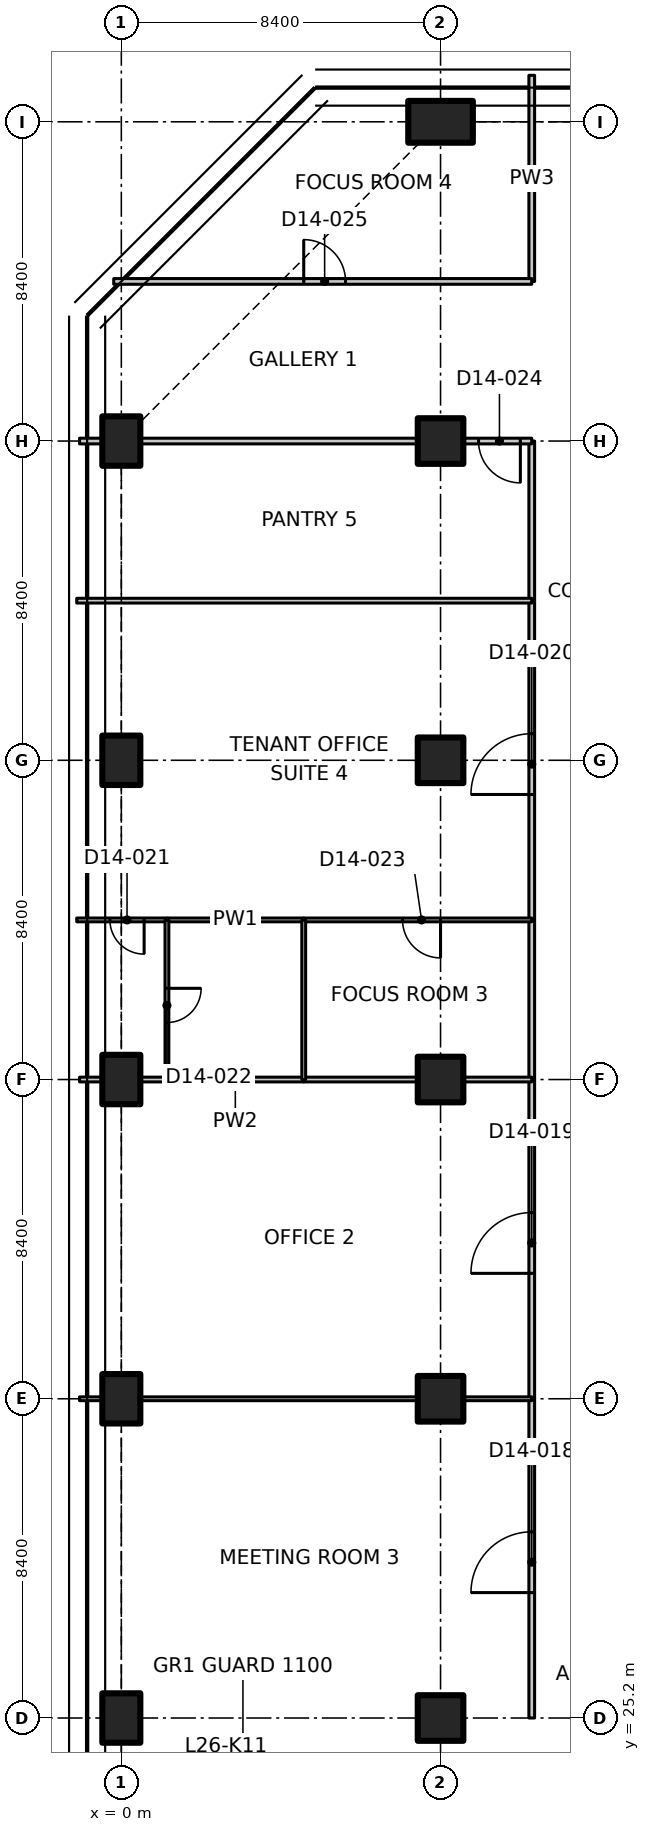
"""IFC4 building model, lengths in metres.
Left out: names, types, materials, properties, quantities, classifications, styles, units other than length and angle.
Written with IfcOpenShell. Run it as: python <this file> out.ifc"""

import sys

from ifc_helpers import new_model, si_unit, direction, frame, frame_2d, origin, origin_2d, place, context, subcontext, project, spatial, polyline, rectangle, outline, extrude, element, fill, save


model = new_model("IFC4")
c1 = context("Model", 3, precision=1e-05, world=origin(), true_north=direction((0.0, 1.0)))
c2 = subcontext(c1, "Body", "Model", "MODEL_VIEW")
j1 = project(units=[si_unit("LENGTHUNIT", "METRE"), si_unit("PLANEANGLEUNIT", "RADIAN")], contexts=[c1])
p1 = place(None, origin())
s1 = spatial("IfcSite", under=j1, at=p1, CompositionType="ELEMENT")
p2 = place(p1, origin())
s2 = spatial("IfcBuilding", under=s1, at=p2, CompositionType="ELEMENT")
p3 = place(p2, frame((0.0, 0.0, 109.7)))
s3 = spatial("IfcBuildingStorey", under=s2, at=p3, CompositionType="ELEMENT", Elevation=109.7)
for number, where, z_axis, x_axis in (
    (1, (0.0, 25.2, 0.0), (0.0, 0.0, 1.0), (1.0, 0.0, 0.0)),
    (2, (0.0, 33.6, 0.0), (0.0, 0.0, 1.0), (1.0, 0.0, 0.0)),
    (3, (0.0, 42.0, 0.0), (0.0, 0.0, 1.0), (1.0, 0.0, 0.0)),
    (4, (0.0, 50.4, 0.0), (0.0, 0.0, 1.0), (1.0, 0.0, 0.0)),
    (5, (0.0, 58.8, 0.0), (0.0, 0.0, 1.0), (1.0, 0.0, 0.0)),
):
    element("IfcColumn", number, at=place(p3, frame(where, z_axis=z_axis, x_axis=x_axis)), inside=s3, PredefinedType="COLUMN", context=c2, shape_type="SweptSolid", body=[
        extrude(rectangle(XDim=1.0, YDim=1.3, at=origin_2d()), origin(), (0.0, 0.0, 1.0), 3.35),
    ])
for number, where, z_axis, x_axis in (
    (6, (8.4, 25.2, 0.0), (0.0, 0.0, 1.0), (1.0, 0.0, 0.0)),
    (7, (8.4, 33.6, 0.0), (0.0, 0.0, 1.0), (1.0, 0.0, 0.0)),
    (8, (8.4, 42.0, 0.0), (0.0, 0.0, 1.0), (1.0, 0.0, 0.0)),
    (9, (8.4, 50.4, 0.0), (0.0, 0.0, 1.0), (1.0, 0.0, 0.0)),
    (10, (8.4, 58.8, 0.0), (0.0, 0.0, 1.0), (1.0, 0.0, 0.0)),
):
    element("IfcColumn", number, at=place(p3, frame(where, z_axis=z_axis, x_axis=x_axis)), inside=s3, PredefinedType="COLUMN", context=c2, shape_type="SweptSolid", body=[
        extrude(rectangle(XDim=1.2, YDim=1.2, at=origin_2d()), origin(), (0.0, 0.0, 1.0), 3.35),
    ])
p4 = place(p3, frame((8.4, 67.2, 0.0), z_axis=(0.0, 0.0, 1.0), x_axis=(0.0, 1.0, 0.0)))
e11 = element("IfcColumn", 11, at=p4, inside=s3, PredefinedType="COLUMN", context=c2, shape_type="SweptSolid", body=[
    extrude(rectangle(XDim=1.1, YDim=1.7, at=origin_2d()), origin(), (0.0, 0.0, 1.0), 3.35),
])
p5 = place(p3, frame((10.8, 25.2, 0.0), z_axis=(0.0, 0.0, 1.0), x_axis=(0.0, 1.0, 0.0)))
e12 = element("IfcWall", 12, at=p5, inside=s3, PredefinedType="PARTITIONING", context=c2, shape_type="SweptSolid", body=[
    extrude(rectangle(XDim=8.4, YDim=0.15, at=frame_2d((4.2, 0.0))), origin(), (0.0, 0.0, 1.0), 3.33),
])
p6 = place(p5, frame((3.3, 0.0, 0.0)))
e13 = element("IfcOpeningElement", 13, at=p6, cuts=e12, PredefinedType="OPENING", context=c2, shape_type="SweptSolid", body=[
    extrude(rectangle(XDim=1.6, YDim=2.1, at=frame_2d((0.8, 1.05))), frame((0.0, 0.085, 0.0), z_axis=(0.0, -1.0, 0.0), x_axis=(1.0, 0.0, 0.0)), (0.0, 0.0, 1.0), 0.17),
])
p7 = place(p3, frame((10.8, 33.6, 0.0), z_axis=(0.0, 0.0, 1.0), x_axis=(0.0, 1.0, 0.0)))
e14 = element("IfcWall", 14, at=p7, inside=s3, PredefinedType="PARTITIONING", context=c2, shape_type="SweptSolid", body=[
    extrude(rectangle(XDim=8.4, YDim=0.15, at=frame_2d((4.2, 0.0))), origin(), (0.0, 0.0, 1.0), 3.33),
])
p8 = place(p7, frame((3.3, 0.0, 0.0)))
e15 = element("IfcOpeningElement", 15, at=p8, cuts=e14, PredefinedType="OPENING", context=c2, shape_type="SweptSolid", body=[
    extrude(rectangle(XDim=1.6, YDim=2.1, at=frame_2d((0.8, 1.05))), frame((0.0, 0.085, 0.0), z_axis=(0.0, -1.0, 0.0), x_axis=(1.0, 0.0, 0.0)), (0.0, 0.0, 1.0), 0.17),
])
p9 = place(p3, frame((10.8, 46.2, 0.0), z_axis=(0.0, 0.0, 1.0), x_axis=(0.0, 1.0, 0.0)))
e16 = element("IfcWall", 16, at=p9, inside=s3, PredefinedType="PARTITIONING", context=c2, shape_type="SweptSolid", body=[
    extrude(rectangle(XDim=8.4, YDim=0.15, at=frame_2d((4.2, 0.0))), origin(), (0.0, 0.0, 1.0), 3.33),
])
p10 = place(p9, frame((3.3, 0.0, 0.0)))
e17 = element("IfcOpeningElement", 17, at=p10, cuts=e16, PredefinedType="OPENING", context=c2, shape_type="SweptSolid", body=[
    extrude(rectangle(XDim=1.6, YDim=2.1, at=frame_2d((0.8, 1.05))), frame((0.0, 0.085, 0.0), z_axis=(0.0, -1.0, 0.0), x_axis=(1.0, 0.0, 0.0)), (0.0, 0.0, 1.0), 0.17),
])
for number, where, z_axis, x_axis in (
    (18, (10.8, 42.0, 0.0), (0.0, 0.0, 1.0), (0.0, 1.0, 0.0)),
    (19, (10.8, 54.6, 0.0), (0.0, 0.0, 1.0), (0.0, 1.0, 0.0)),
):
    element("IfcWall", number, at=place(p3, frame(where, z_axis=z_axis, x_axis=x_axis)), inside=s3, PredefinedType="PARTITIONING", context=c2, shape_type="SweptSolid", body=[
        extrude(rectangle(XDim=4.2, YDim=0.15, at=frame_2d((2.1, 0.0))), origin(), (0.0, 0.0, 1.0), 3.33),
    ])
p11 = place(p3, frame((10.8, 63.0, 0.0), z_axis=(0.0, 0.0, 1.0), x_axis=(0.0, 1.0, 0.0)))
e20 = element("IfcWall", 20, at=p11, inside=s3, PredefinedType="PARTITIONING", context=c2, shape_type="SweptSolid", body=[
    extrude(outline(polyline([(0.0, 0.0), (5.423, 0.0), (5.423, 3.33), (5.28, 3.33), (4.65, 3.33), (4.648, 2.98), (3.752, 2.98), (3.75, 3.33), (0.0, 3.33), (0.0, 0.0)])), frame((0.0, 0.075, 0.0), z_axis=(0.0, -1.0, 0.0), x_axis=(1.0, 0.0, 0.0)), (0.0, 0.0, 1.0), 0.15),
])
p12 = place(p3, frame((10.8, 58.8, 0.0), z_axis=(0.0, 0.0, 1.0), x_axis=(-1.0, 0.0, 0.0)))
e21 = element("IfcWall", 21, at=p12, inside=s3, PredefinedType="PARTITIONING", context=c2, shape_type="SweptSolid", body=[
    extrude(rectangle(XDim=1.78, YDim=0.15, at=frame_2d((0.89, 0.0))), origin(), (0.0, 0.0, 1.0), 3.33),
])
p13 = place(p12, frame((0.3, 0.0, 0.0)))
e22 = element("IfcOpeningElement", 22, at=p13, cuts=e21, PredefinedType="OPENING", context=c2, shape_type="SweptSolid", body=[
    extrude(rectangle(XDim=1.1, YDim=2.1, at=frame_2d((0.55, 1.05))), frame((0.0, 0.085, 0.0), z_axis=(0.0, -1.0, 0.0), x_axis=(1.0, 0.0, 0.0)), (0.0, 0.0, 1.0), 0.17),
])
p14 = place(p3, frame((7.78, 58.8, 0.0), z_axis=(0.0, 0.0, 1.0), x_axis=(-1.0, 0.0, 0.0)))
e23 = element("IfcWall", 23, at=p14, inside=s3, PredefinedType="PARTITIONING", context=c2, shape_type="SweptSolid", body=[
    extrude(outline(polyline([(0.0, 0.0), (7.26, 0.0), (7.26, 2.98), (7.091, 2.98), (7.089, 3.33), (0.0, 3.33), (0.0, 0.0)])), frame((0.0, 0.075, 0.0), z_axis=(0.0, -1.0, 0.0), x_axis=(1.0, 0.0, 0.0)), (0.0, 0.0, 1.0), 0.15),
])
p15 = place(p3, frame((-0.52, 58.8, 0.0), z_axis=(0.0, 0.0, 1.0), x_axis=(-1.0, 0.0, 0.0)))
e24 = element("IfcWall", 24, at=p15, inside=s3, PredefinedType="PARTITIONING", context=c2, shape_type="SweptSolid", body=[
    extrude(rectangle(XDim=0.58, YDim=0.15, at=frame_2d((0.29, 0.0))), origin(), (0.0, 0.0, 1.0), 3.33),
])
p16 = place(p3, frame((-0.2, 63.0, 0.0), z_axis=(0.0, 0.0, 1.0), x_axis=(1.0, 0.0, 0.0)))
e25 = element("IfcWall", 25, at=p16, inside=s3, PredefinedType="PARTITIONING", context=c2, shape_type="SweptSolid", body=[
    extrude(outline(polyline([(0.0, 0.0), (11.0, 0.0), (11.0, 3.33), (5.091, 3.33), (5.089, 2.98), (3.711, 2.98), (3.709, 3.33), (0.0, 3.33), (0.0, 0.0)])), frame((0.0, 0.075, 0.0), z_axis=(0.0, -1.0, 0.0), x_axis=(1.0, 0.0, 0.0)), (0.0, 0.0, 1.0), 0.15),
])
p17 = place(p16, frame((5.0, 0.0, 0.0)))
e26 = element("IfcOpeningElement", 26, at=p17, cuts=e25, PredefinedType="OPENING", context=c2, shape_type="SweptSolid", body=[
    extrude(rectangle(XDim=1.1, YDim=2.1, at=frame_2d((0.55, 1.05))), frame((0.0, 0.085, 0.0), z_axis=(0.0, -1.0, 0.0), x_axis=(1.0, 0.0, 0.0)), (0.0, 0.0, 1.0), 0.17),
])
p18 = place(p3, frame((-1.1, 33.6, 0.0), z_axis=(0.0, 0.0, 1.0), x_axis=(1.0, 0.0, 0.0)))
e27 = element("IfcWall", 27, at=p18, inside=s3, PredefinedType="PARTITIONING", context=c2, shape_type="SweptSolid", body=[
    extrude(rectangle(XDim=0.58, YDim=0.1, at=frame_2d((0.29, 0.0))), origin(), (0.0, 0.0, 1.0), 3.33),
])
p19 = place(p3, frame((0.52, 33.6, 0.0), z_axis=(0.0, 0.0, 1.0), x_axis=(1.0, 0.0, 0.0)))
e28 = element("IfcWall", 28, at=p19, inside=s3, PredefinedType="PARTITIONING", context=c2, shape_type="SweptSolid", body=[
    extrude(rectangle(XDim=7.26, YDim=0.1, at=frame_2d((3.63, 0.0))), origin(), (0.0, 0.0, 1.0), 3.33),
])
p20 = place(p3, frame((9.02, 33.6, 0.0), z_axis=(0.0, 0.0, 1.0), x_axis=(1.0, 0.0, 0.0)))
e29 = element("IfcWall", 29, at=p20, inside=s3, PredefinedType="PARTITIONING", context=c2, shape_type="SweptSolid", body=[
    extrude(rectangle(XDim=1.78, YDim=0.1, at=frame_2d((0.89, 0.0))), origin(), (0.0, 0.0, 1.0), 3.33),
])
p21 = place(p3, frame((-1.1, 42.0, 0.0), z_axis=(0.0, 0.0, 1.0), x_axis=(1.0, 0.0, 0.0)))
e30 = element("IfcWall", 30, at=p21, inside=s3, PredefinedType="PARTITIONING", context=c2, shape_type="SweptSolid", body=[
    extrude(rectangle(XDim=0.58, YDim=0.125, at=frame_2d((0.29, 0.0))), origin(), (0.0, 0.0, 1.0), 3.33),
])
p22 = place(p3, frame((0.52, 42.0, 0.0), z_axis=(0.0, 0.0, 1.0), x_axis=(1.0, 0.0, 0.0)))
e31 = element("IfcWall", 31, at=p22, inside=s3, PredefinedType="PARTITIONING", context=c2, shape_type="SweptSolid", body=[
    extrude(rectangle(XDim=0.68, YDim=0.125, at=frame_2d((0.34, 0.0))), origin(), (0.0, 0.0, 1.0), 3.33),
])
p23 = place(p3, frame((1.2, 42.0, 0.0), z_axis=(0.0, 0.0, 1.0), x_axis=(1.0, 0.0, 0.0)))
e32 = element("IfcWall", 32, at=p23, inside=s3, PredefinedType="PARTITIONING", context=c2, shape_type="SweptSolid", body=[
    extrude(rectangle(XDim=3.6, YDim=0.125, at=frame_2d((1.8, 0.0))), origin(), (0.0, 0.0, 1.0), 3.33),
])
p24 = place(p3, frame((4.8, 42.0, 0.0), z_axis=(0.0, 0.0, 1.0), x_axis=(1.0, 0.0, 0.0)))
e33 = element("IfcWall", 33, at=p24, inside=s3, PredefinedType="PARTITIONING", context=c2, shape_type="SweptSolid", body=[
    extrude(rectangle(XDim=2.98, YDim=0.125, at=frame_2d((1.49, 0.0))), origin(), (0.0, 0.0, 1.0), 3.33),
])
p25 = place(p3, frame((9.02, 42.0, 0.0), z_axis=(0.0, 0.0, 1.0), x_axis=(1.0, 0.0, 0.0)))
e34 = element("IfcWall", 34, at=p25, inside=s3, PredefinedType="PARTITIONING", context=c2, shape_type="SweptSolid", body=[
    extrude(rectangle(XDim=1.78, YDim=0.125, at=frame_2d((0.89, 0.0))), origin(), (0.0, 0.0, 1.0), 3.33),
])
p26 = place(p3, frame((1.2, 46.2, 0.0), z_axis=(0.0, 0.0, 1.0), x_axis=(-1.0, 0.0, 0.0)))
e35 = element("IfcWall", 35, at=p26, inside=s3, PredefinedType="PARTITIONING", context=c2, shape_type="SweptSolid", body=[
    extrude(rectangle(XDim=2.374, YDim=0.1, at=frame_2d((1.187, 0.0))), origin(), (0.0, 0.0, 1.0), 2.98),
])
p27 = place(p26, frame((0.6, 0.0, 0.0)))
e36 = element("IfcOpeningElement", 36, at=p27, cuts=e35, PredefinedType="OPENING", context=c2, shape_type="SweptSolid", body=[
    extrude(rectangle(XDim=0.9, YDim=2.1, at=frame_2d((0.45, 1.05))), frame((0.0, 0.06, 0.0), z_axis=(0.0, -1.0, 0.0), x_axis=(1.0, 0.0, 0.0)), (0.0, 0.0, 1.0), 0.12),
])
p28 = place(p3, frame((4.8, 46.2, 0.0), z_axis=(0.0, 0.0, 1.0), x_axis=(-1.0, 0.0, 0.0)))
e37 = element("IfcWall", 37, at=p28, inside=s3, PredefinedType="PARTITIONING", context=c2, shape_type="SweptSolid", body=[
    extrude(rectangle(XDim=3.6, YDim=0.1, at=frame_2d((1.8, 0.0))), origin(), (0.0, 0.0, 1.0), 3.33),
])
p29 = place(p3, frame((10.8, 46.2, 0.0), z_axis=(0.0, 0.0, 1.0), x_axis=(-1.0, 0.0, 0.0)))
e38 = element("IfcWall", 38, at=p29, inside=s3, PredefinedType="PARTITIONING", context=c2, shape_type="SweptSolid", body=[
    extrude(rectangle(XDim=6.0, YDim=0.1, at=frame_2d((3.0, 0.0))), origin(), (0.0, 0.0, 1.0), 3.33),
])
p30 = place(p29, frame((2.4, 0.0, 0.0)))
e39 = element("IfcOpeningElement", 39, at=p30, cuts=e38, PredefinedType="OPENING", context=c2, shape_type="SweptSolid", body=[
    extrude(rectangle(XDim=1.0, YDim=2.1, at=frame_2d((0.5, 1.05))), frame((0.0, 0.06, 0.0), z_axis=(0.0, -1.0, 0.0), x_axis=(1.0, 0.0, 0.0)), (0.0, 0.0, 1.0), 0.12),
])
p31 = place(p3, frame((-1.174, 54.6, 0.0), z_axis=(0.0, 0.0, 1.0), x_axis=(1.0, 0.0, 0.0)))
e40 = element("IfcWall", 40, at=p31, inside=s3, PredefinedType="PARTITIONING", context=c2, shape_type="SweptSolid", body=[
    extrude(outline(polyline([(0.0, 0.0), (11.974, 0.0), (11.974, 3.33), (1.624, 3.33), (1.622, 2.98), (0.726, 2.98), (0.724, 3.33), (0.074, 3.33), (0.0, 3.33), (0.0, 0.0)])), frame((0.0, 0.062, 0.0), z_axis=(0.0, -1.0, 0.0), x_axis=(1.0, 0.0, 0.0)), (0.0, 0.0, 1.0), 0.125),
])
p32 = place(p3, frame((1.2, 46.2, 0.0), z_axis=(0.0, 0.0, 1.0), x_axis=(0.0, -1.0, 0.0)))
e41 = element("IfcWall", 41, at=p32, inside=s3, PredefinedType="PARTITIONING", context=c2, shape_type="SweptSolid", body=[
    extrude(rectangle(XDim=4.2, YDim=0.1, at=frame_2d((2.1, 0.0))), origin(), (0.0, 0.0, 1.0), 3.33),
])
p33 = place(p32, frame((1.8, 0.0, 0.0)))
e42 = element("IfcOpeningElement", 42, at=p33, cuts=e41, PredefinedType="OPENING", context=c2, shape_type="SweptSolid", body=[
    extrude(rectangle(XDim=0.9, YDim=2.1, at=frame_2d((0.45, 1.05))), frame((0.0, 0.06, 0.0), z_axis=(0.0, -1.0, 0.0), x_axis=(1.0, 0.0, 0.0)), (0.0, 0.0, 1.0), 0.12),
])
p34 = place(p3, frame((4.8, 46.2, 0.0), z_axis=(0.0, 0.0, 1.0), x_axis=(0.0, -1.0, 0.0)))
e43 = element("IfcWall", 43, at=p34, inside=s3, PredefinedType="PARTITIONING", context=c2, shape_type="SweptSolid", body=[
    extrude(rectangle(XDim=4.2, YDim=0.1, at=frame_2d((2.1, 0.0))), origin(), (0.0, 0.0, 1.0), 3.33),
])
p35 = place(p6, origin())
e44 = element("IfcDoor", 44, at=p35, inside=s3, OperationType="DOUBLE_DOOR_SINGLE_SWING", PredefinedType="DOOR", context=c2, shape_type="SweptSolid", body=[
    extrude(rectangle(XDim=1.6, YDim=2.1, at=frame_2d((0.8, 1.05))), frame((0.0, 0.025, 0.0), z_axis=(0.0, -1.0, 0.0), x_axis=(1.0, 0.0, 0.0)), (0.0, 0.0, 1.0), 0.05),
])
fill(e13, e44)
p36 = place(p8, origin())
e45 = element("IfcDoor", 45, at=p36, inside=s3, OperationType="DOUBLE_DOOR_SINGLE_SWING", PredefinedType="DOOR", context=c2, shape_type="SweptSolid", body=[
    extrude(rectangle(XDim=1.6, YDim=2.1, at=frame_2d((0.8, 1.05))), frame((0.0, 0.025, 0.0), z_axis=(0.0, -1.0, 0.0), x_axis=(1.0, 0.0, 0.0)), (0.0, 0.0, 1.0), 0.05),
])
fill(e15, e45)
p37 = place(p10, origin())
e46 = element("IfcDoor", 46, at=p37, inside=s3, OperationType="DOUBLE_DOOR_SINGLE_SWING", PredefinedType="DOOR", context=c2, shape_type="SweptSolid", body=[
    extrude(rectangle(XDim=1.6, YDim=2.1, at=frame_2d((0.8, 1.05))), frame((0.0, 0.025, 0.0), z_axis=(0.0, -1.0, 0.0), x_axis=(1.0, 0.0, 0.0)), (0.0, 0.0, 1.0), 0.05),
])
fill(e17, e46)
p38 = place(p27, origin())
e47 = element("IfcDoor", 47, at=p38, inside=s3, OperationType="SINGLE_SWING_LEFT", PredefinedType="DOOR", context=c2, shape_type="SweptSolid", body=[
    extrude(rectangle(XDim=0.9, YDim=2.1, at=frame_2d((0.45, 1.05))), frame((0.0, 0.025, 0.0), z_axis=(0.0, -1.0, 0.0), x_axis=(1.0, 0.0, 0.0)), (0.0, 0.0, 1.0), 0.05),
])
fill(e36, e47)
p39 = place(p33, origin())
e48 = element("IfcDoor", 48, at=p39, inside=s3, OperationType="SINGLE_SWING_LEFT", PredefinedType="DOOR", context=c2, shape_type="SweptSolid", body=[
    extrude(rectangle(XDim=0.9, YDim=2.1, at=frame_2d((0.45, 1.05))), frame((0.0, 0.025, 0.0), z_axis=(0.0, -1.0, 0.0), x_axis=(1.0, 0.0, 0.0)), (0.0, 0.0, 1.0), 0.05),
])
fill(e42, e48)
p40 = place(p30, origin())
e49 = element("IfcDoor", 49, at=p40, inside=s3, OperationType="SINGLE_SWING_LEFT", PredefinedType="DOOR", context=c2, shape_type="SweptSolid", body=[
    extrude(rectangle(XDim=1.0, YDim=2.1, at=frame_2d((0.5, 1.05))), frame((0.0, 0.025, 0.0), z_axis=(0.0, -1.0, 0.0), x_axis=(1.0, 0.0, 0.0)), (0.0, 0.0, 1.0), 0.05),
])
fill(e39, e49)
p41 = place(p13, origin())
e50 = element("IfcDoor", 50, at=p41, inside=s3, OperationType="SINGLE_SWING_LEFT", PredefinedType="DOOR", context=c2, shape_type="SweptSolid", body=[
    extrude(rectangle(XDim=1.1, YDim=2.1, at=frame_2d((0.55, 1.05))), frame((0.0, 0.025, 0.0), z_axis=(0.0, -1.0, 0.0), x_axis=(1.0, 0.0, 0.0)), (0.0, 0.0, 1.0), 0.05),
])
fill(e22, e50)
p42 = place(p17, origin())
e51 = element("IfcDoor", 51, at=p42, inside=s3, OperationType="SINGLE_SWING_LEFT", PredefinedType="DOOR", context=c2, shape_type="SweptSolid", body=[
    extrude(rectangle(XDim=1.1, YDim=2.1, at=frame_2d((0.55, 1.05))), frame((0.0, 0.025, 0.0), z_axis=(0.0, -1.0, 0.0), x_axis=(1.0, 0.0, 0.0)), (0.0, 0.0, 1.0), 0.05),
])
fill(e26, e51)
save(model, sys.argv[1])
